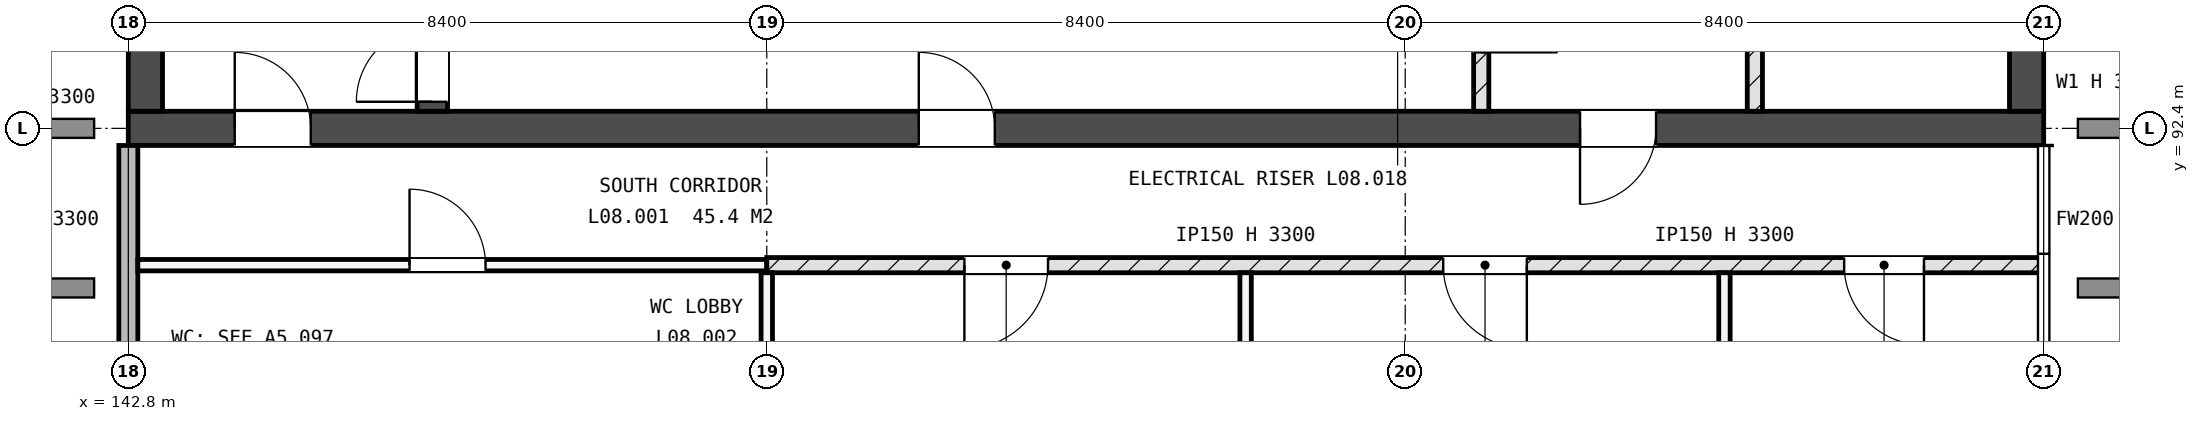
"""IFC4 building model, lengths in metres.
Left out: names, types, materials, properties, quantities, classifications, styles, units other than length and angle.
Written with IfcOpenShell. Run it as: python <this file> out.ifc"""

import sys

from ifc_helpers import new_model, si_unit, direction, frame, frame_2d, origin, place, context, subcontext, project, spatial, rectangle, extrude, element, fill, save


model = new_model("IFC4")
c1 = context("Model", 3, precision=1e-05, world=origin(), true_north=direction((0.0, 1.0)))
c2 = subcontext(c1, "Body", "Model", "MODEL_VIEW")
j1 = project(units=[si_unit("LENGTHUNIT", "METRE"), si_unit("PLANEANGLEUNIT", "RADIAN")], contexts=[c1])
p1 = place(None, origin())
s1 = spatial("IfcSite", under=j1, at=p1, CompositionType="ELEMENT")
p2 = place(p1, origin())
s2 = spatial("IfcBuilding", under=s1, at=p2, CompositionType="ELEMENT")
p3 = place(p2, frame((0.0, 0.0, 32.4)))
s3 = spatial("IfcBuildingStorey", under=s2, at=p3, CompositionType="ELEMENT", Elevation=32.4)
p4 = place(p3, frame((142.8, 92.4, -0.25), z_axis=(0.0, 0.0, 1.0), x_axis=(1.0, 0.0, 0.0)))
e1 = element("IfcWall", 1, at=p4, inside=s3, PredefinedType="SHEAR", context=c2, shape_type="SweptSolid", body=[
    extrude(rectangle(XDim=25.2, YDim=0.45, at=frame_2d((12.6, 0.0))), origin(), (0.0, 0.0, 1.0), 3.6),
])
p5 = place(p4, frame((1.4, 0.0, 0.25)))
e2 = element("IfcOpeningElement", 2, at=p5, cuts=e1, PredefinedType="OPENING", context=c2, shape_type="SweptSolid", body=[
    extrude(rectangle(XDim=1.0, YDim=2.1, at=frame_2d((0.5, 1.05))), frame((0.0, 0.235, 0.0), z_axis=(0.0, -1.0, 0.0), x_axis=(1.0, 0.0, 0.0)), (0.0, 0.0, 1.0), 0.47),
])
p6 = place(p4, frame((19.1, 0.0, 0.25)))
e3 = element("IfcOpeningElement", 3, at=p6, cuts=e1, PredefinedType="OPENING", context=c2, shape_type="SweptSolid", body=[
    extrude(rectangle(XDim=1.0, YDim=2.1, at=frame_2d((0.5, 1.05))), frame((0.0, 0.235, 0.0), z_axis=(0.0, -1.0, 0.0), x_axis=(1.0, 0.0, 0.0)), (0.0, 0.0, 1.0), 0.47),
])
p7 = place(p4, frame((10.4, 0.0, 0.25)))
e4 = element("IfcOpeningElement", 4, at=p7, cuts=e1, PredefinedType="OPENING", context=c2, shape_type="SweptSolid", body=[
    extrude(rectangle(XDim=1.0, YDim=2.1, at=frame_2d((0.5, 1.05))), frame((0.0, 0.235, 0.0), z_axis=(0.0, -1.0, 0.0), x_axis=(1.0, 0.0, 0.0)), (0.0, 0.0, 1.0), 0.47),
])
p8 = place(p3, frame((143.025, 92.625, -0.25), z_axis=(0.0, 0.0, 1.0), x_axis=(0.0, 1.0, 0.0)))
e5 = element("IfcWall", 5, at=p8, inside=s3, PredefinedType="SHEAR", context=c2, shape_type="SweptSolid", body=[
    extrude(rectangle(XDim=16.35, YDim=0.45, at=frame_2d((8.175, 0.0))), origin(), (0.0, 0.0, 1.0), 3.6),
])
p9 = place(p8, frame((2.975, 0.0, 1.85)))
e6 = element("IfcOpeningElement", 6, at=p9, cuts=e5, PredefinedType="OPENING", context=c2, shape_type="SweptSolid", body=[
    extrude(rectangle(XDim=1.2, YDim=0.9, at=frame_2d((0.6, 0.45))), frame((0.0, 0.235, 0.0), z_axis=(0.0, -1.0, 0.0), x_axis=(1.0, 0.0, 0.0)), (0.0, 0.0, 1.0), 0.47),
])
p10 = place(p3, frame((167.775, 92.625, -0.25), z_axis=(0.0, 0.0, 1.0), x_axis=(0.0, 1.0, 0.0)))
e7 = element("IfcWall", 7, at=p10, inside=s3, PredefinedType="SHEAR", context=c2, shape_type="SweptSolid", body=[
    extrude(rectangle(XDim=16.35, YDim=0.45, at=frame_2d((8.175, 0.0))), origin(), (0.0, 0.0, 1.0), 3.6),
])
p11 = place(p10, frame((12.175, 0.0, 1.85)))
e8 = element("IfcOpeningElement", 8, at=p11, cuts=e7, PredefinedType="OPENING", context=c2, shape_type="SweptSolid", body=[
    extrude(rectangle(XDim=1.2, YDim=0.9, at=frame_2d((0.6, 0.45))), frame((0.0, 0.235, 0.0), z_axis=(0.0, -1.0, 0.0), x_axis=(1.0, 0.0, 0.0)), (0.0, 0.0, 1.0), 0.47),
])
p12 = place(p3, frame((146.8, 92.625, -0.25), z_axis=(0.0, 0.0, 1.0), x_axis=(0.0, 1.0, 0.0)))
e9 = element("IfcWall", 9, at=p12, inside=s3, PredefinedType="SHEAR", context=c2, shape_type="SweptSolid", body=[
    extrude(rectangle(XDim=7.5, YDim=0.4, at=frame_2d((3.75, 0.0))), origin(), (0.0, 0.0, 1.0), 3.6),
])
p13 = place(p12, frame((0.125, 0.0, 0.25)))
e10 = element("IfcOpeningElement", 10, at=p13, cuts=e9, PredefinedType="OPENING", context=c2, shape_type="SweptSolid", body=[
    extrude(rectangle(XDim=1.0, YDim=2.1, at=frame_2d((0.5, 1.05))), frame((0.0, 0.21, 0.0), z_axis=(0.0, -1.0, 0.0), x_axis=(1.0, 0.0, 0.0)), (0.0, 0.0, 1.0), 0.42),
])
p14 = place(p3, frame((142.8, 84.45, 0.0), z_axis=(0.0, 0.0, 1.0), x_axis=(0.0, 1.0, 0.0)))
e11 = element("IfcWall", 11, at=p14, inside=s3, PredefinedType="STANDARD", context=c2, shape_type="SweptSolid", body=[
    extrude(rectangle(XDim=7.725, YDim=0.25, at=frame_2d((3.863, 0.0))), origin(), (0.0, 0.0, 1.0), 3.3),
])
p15 = place(p14, frame((2.25, 0.0, 2.1)))
e12 = element("IfcOpeningElement", 12, at=p15, cuts=e11, PredefinedType="OPENING", context=c2, shape_type="SweptSolid", body=[
    extrude(rectangle(XDim=0.9, YDim=0.6, at=frame_2d((0.45, 0.3))), frame((0.0, 0.135, 0.0), z_axis=(0.0, -1.0, 0.0), x_axis=(1.0, 0.0, 0.0)), (0.0, 0.0, 1.0), 0.27),
])
p16 = place(p3, frame((142.925, 90.6, 0.0), z_axis=(0.0, 0.0, 1.0), x_axis=(1.0, 0.0, 0.0)))
e13 = element("IfcWall", 13, at=p16, inside=s3, PredefinedType="PARTITIONING", context=c2, shape_type="SweptSolid", body=[
    extrude(rectangle(XDim=8.275, YDim=0.15, at=frame_2d((4.137, 0.0))), origin(), (0.0, 0.0, 1.0), 3.3),
])
p17 = place(p16, frame((3.575, 0.0, 0.0)))
e14 = element("IfcOpeningElement", 14, at=p17, cuts=e13, PredefinedType="OPENING", context=c2, shape_type="SweptSolid", body=[
    extrude(rectangle(XDim=1.0, YDim=2.1, at=frame_2d((0.5, 1.05))), frame((0.0, 0.085, 0.0), z_axis=(0.0, -1.0, 0.0), x_axis=(1.0, 0.0, 0.0)), (0.0, 0.0, 1.0), 0.17),
])
p18 = place(p3, frame((151.2, 90.6, 0.0), z_axis=(0.0, 0.0, 1.0), x_axis=(1.0, 0.0, 0.0)))
e15 = element("IfcWall", 15, at=p18, inside=s3, PredefinedType="SOLIDWALL", context=c2, shape_type="SweptSolid", body=[
    extrude(rectangle(XDim=16.8, YDim=0.2, at=frame_2d((8.4, 0.0))), origin(), (0.0, 0.0, 1.0), 3.3),
])
p19 = place(p18, frame((2.6, 0.0, 0.0)))
e16 = element("IfcOpeningElement", 16, at=p19, cuts=e15, PredefinedType="OPENING", context=c2, shape_type="SweptSolid", body=[
    extrude(rectangle(XDim=1.1, YDim=2.25, at=frame_2d((0.55, 1.125))), frame((0.0, 0.11, 0.0), z_axis=(0.0, -1.0, 0.0), x_axis=(1.0, 0.0, 0.0)), (0.0, 0.0, 1.0), 0.22),
])
p20 = place(p18, frame((8.9, 0.0, 0.0)))
e17 = element("IfcOpeningElement", 17, at=p20, cuts=e15, PredefinedType="OPENING", context=c2, shape_type="SweptSolid", body=[
    extrude(rectangle(XDim=1.1, YDim=2.25, at=frame_2d((0.55, 1.125))), frame((0.0, 0.11, 0.0), z_axis=(0.0, -1.0, 0.0), x_axis=(1.0, 0.0, 0.0)), (0.0, 0.0, 1.0), 0.22),
])
p21 = place(p18, frame((14.175, 0.0, 0.0)))
e18 = element("IfcOpeningElement", 18, at=p21, cuts=e15, PredefinedType="OPENING", context=c2, shape_type="SweptSolid", body=[
    extrude(rectangle(XDim=1.05, YDim=2.1, at=frame_2d((0.525, 1.05))), frame((0.0, 0.11, 0.0), z_axis=(0.0, -1.0, 0.0), x_axis=(1.0, 0.0, 0.0)), (0.0, 0.0, 1.0), 0.22),
])
p22 = place(p3, frame((151.2, 84.0, 0.0), z_axis=(0.0, 0.0, 1.0), x_axis=(0.0, 1.0, 0.0)))
e19 = element("IfcWall", 19, at=p22, inside=s3, PredefinedType="PARTITIONING", context=c2, shape_type="SweptSolid", body=[
    extrude(rectangle(XDim=6.5, YDim=0.15, at=frame_2d((3.25, 0.0))), origin(), (0.0, 0.0, 1.0), 2.6),
])
p23 = place(p3, frame((157.5, 84.0, 0.0), z_axis=(0.0, 0.0, 1.0), x_axis=(0.0, 1.0, 0.0)))
e20 = element("IfcWall", 20, at=p23, inside=s3, PredefinedType="PARTITIONING", context=c2, shape_type="SweptSolid", body=[
    extrude(rectangle(XDim=6.5, YDim=0.15, at=frame_2d((3.25, 0.0))), origin(), (0.0, 0.0, 1.0), 3.3),
])
p24 = place(p3, frame((160.6, 92.625, 0.0), z_axis=(0.0, 0.0, 1.0), x_axis=(0.0, 1.0, 0.0)))
e21 = element("IfcWall", 21, at=p24, inside=s3, PredefinedType="SOLIDWALL", context=c2, shape_type="SweptSolid", body=[
    extrude(rectangle(XDim=12.475, YDim=0.2, at=frame_2d((6.238, 0.0))), origin(), (0.0, 0.0, 1.0), 3.3),
])
p25 = place(p24, frame((5.075, 0.0, 0.0)))
e22 = element("IfcOpeningElement", 22, at=p25, cuts=e21, PredefinedType="OPENING", context=c2, shape_type="SweptSolid", body=[
    extrude(rectangle(XDim=0.8, YDim=2.1, at=frame_2d((0.4, 1.05))), frame((0.0, 0.11, 0.0), z_axis=(0.0, -1.0, 0.0), x_axis=(1.0, 0.0, 0.0)), (0.0, 0.0, 1.0), 0.22),
])
p26 = place(p24, frame((0.775, 0.0, 0.0)))
e23 = element("IfcOpeningElement", 23, at=p26, cuts=e21, PredefinedType="OPENING", context=c2, shape_type="SweptSolid", body=[
    extrude(rectangle(XDim=1.0, YDim=2.1, at=frame_2d((0.5, 1.05))), frame((0.0, 0.11, 0.0), z_axis=(0.0, -1.0, 0.0), x_axis=(1.0, 0.0, 0.0)), (0.0, 0.0, 1.0), 0.22),
])
p27 = place(p3, frame((163.8, 84.0, 0.0), z_axis=(0.0, 0.0, 1.0), x_axis=(0.0, 1.0, 0.0)))
e24 = element("IfcWall", 24, at=p27, inside=s3, PredefinedType="PARTITIONING", context=c2, shape_type="SweptSolid", body=[
    extrude(rectangle(XDim=6.5, YDim=0.15, at=frame_2d((3.25, 0.0))), origin(), (0.0, 0.0, 1.0), 3.3),
])
p28 = place(p3, frame((164.2, 92.625, 0.0), z_axis=(0.0, 0.0, 1.0), x_axis=(0.0, 1.0, 0.0)))
e25 = element("IfcWall", 25, at=p28, inside=s3, PredefinedType="SOLIDWALL", context=c2, shape_type="SweptSolid", body=[
    extrude(rectangle(XDim=8.725, YDim=0.2, at=frame_2d((4.363, 0.0))), origin(), (0.0, 0.0, 1.0), 3.3),
])
p29 = place(p28, frame((1.675, 0.0, 0.0)))
e26 = element("IfcOpeningElement", 26, at=p29, cuts=e25, PredefinedType="OPENING", context=c2, shape_type="SweptSolid", body=[
    extrude(rectangle(XDim=0.8, YDim=2.1, at=frame_2d((0.4, 1.05))), frame((0.0, 0.11, 0.0), z_axis=(0.0, -1.0, 0.0), x_axis=(1.0, 0.0, 0.0)), (0.0, 0.0, 1.0), 0.22),
])
p30 = place(p28, frame((6.275, 0.0, 0.0)))
e27 = element("IfcOpeningElement", 27, at=p30, cuts=e25, PredefinedType="OPENING", context=c2, shape_type="SweptSolid", body=[
    extrude(rectangle(XDim=0.8, YDim=2.1, at=frame_2d((0.4, 1.05))), frame((0.0, 0.11, 0.0), z_axis=(0.0, -1.0, 0.0), x_axis=(1.0, 0.0, 0.0)), (0.0, 0.0, 1.0), 0.22),
])
p31 = place(p5, origin())
e28 = element("IfcDoor", 28, at=p31, inside=s3, OperationType="SINGLE_SWING_RIGHT", PredefinedType="DOOR", context=c2, shape_type="SweptSolid", body=[
    extrude(rectangle(XDim=1.0, YDim=2.1, at=frame_2d((0.5, 1.05))), frame((0.0, 0.025, 0.0), z_axis=(0.0, -1.0, 0.0), x_axis=(1.0, 0.0, 0.0)), (0.0, 0.0, 1.0), 0.05),
])
fill(e2, e28)
p32 = place(p13, origin())
e29 = element("IfcDoor", 29, at=p32, inside=s3, OperationType="SINGLE_SWING_RIGHT", PredefinedType="DOOR", context=c2, shape_type="SweptSolid", body=[
    extrude(rectangle(XDim=1.0, YDim=2.1, at=frame_2d((0.5, 1.05))), frame((0.0, 0.025, 0.0), z_axis=(0.0, -1.0, 0.0), x_axis=(1.0, 0.0, 0.0)), (0.0, 0.0, 1.0), 0.05),
])
fill(e10, e29)
p33 = place(p19, origin())
e30 = element("IfcDoor", 30, at=p33, inside=s3, OperationType="SINGLE_SWING_LEFT", PredefinedType="DOOR", context=c2, shape_type="SweptSolid", body=[
    extrude(rectangle(XDim=1.1, YDim=2.25, at=frame_2d((0.55, 1.125))), frame((0.0, 0.025, 0.0), z_axis=(0.0, -1.0, 0.0), x_axis=(1.0, 0.0, 0.0)), (0.0, 0.0, 1.0), 0.05),
])
fill(e16, e30)
p34 = place(p20, origin())
e31 = element("IfcDoor", 31, at=p34, inside=s3, OperationType="SINGLE_SWING_RIGHT", PredefinedType="DOOR", context=c2, shape_type="SweptSolid", body=[
    extrude(rectangle(XDim=1.1, YDim=2.25, at=frame_2d((0.55, 1.125))), frame((0.0, 0.025, 0.0), z_axis=(0.0, -1.0, 0.0), x_axis=(1.0, 0.0, 0.0)), (0.0, 0.0, 1.0), 0.05),
])
fill(e17, e31)
p35 = place(p21, origin())
e32 = element("IfcDoor", 32, at=p35, inside=s3, OperationType="SINGLE_SWING_RIGHT", PredefinedType="DOOR", context=c2, shape_type="SweptSolid", body=[
    extrude(rectangle(XDim=1.05, YDim=2.1, at=frame_2d((0.525, 1.05))), frame((0.0, 0.025, 0.0), z_axis=(0.0, -1.0, 0.0), x_axis=(1.0, 0.0, 0.0)), (0.0, 0.0, 1.0), 0.05),
])
fill(e18, e32)
p36 = place(p17, origin())
e33 = element("IfcDoor", 33, at=p36, inside=s3, OperationType="SINGLE_SWING_RIGHT", PredefinedType="DOOR", context=c2, shape_type="SweptSolid", body=[
    extrude(rectangle(XDim=1.0, YDim=2.1, at=frame_2d((0.5, 1.05))), frame((0.0, 0.025, 0.0), z_axis=(0.0, -1.0, 0.0), x_axis=(1.0, 0.0, 0.0)), (0.0, 0.0, 1.0), 0.05),
])
fill(e14, e33)
p37 = place(p6, origin())
e34 = element("IfcDoor", 34, at=p37, inside=s3, OperationType="SINGLE_SWING_LEFT", PredefinedType="DOOR", context=c2, shape_type="SweptSolid", body=[
    extrude(rectangle(XDim=1.0, YDim=2.1, at=frame_2d((0.5, 1.05))), frame((0.0, 0.025, 0.0), z_axis=(0.0, -1.0, 0.0), x_axis=(1.0, 0.0, 0.0)), (0.0, 0.0, 1.0), 0.05),
])
fill(e3, e34)
p38 = place(p7, origin())
e35 = element("IfcDoor", 35, at=p38, inside=s3, OperationType="SINGLE_SWING_RIGHT", PredefinedType="DOOR", context=c2, shape_type="SweptSolid", body=[
    extrude(rectangle(XDim=1.0, YDim=2.1, at=frame_2d((0.5, 1.05))), frame((0.0, 0.025, 0.0), z_axis=(0.0, -1.0, 0.0), x_axis=(1.0, 0.0, 0.0)), (0.0, 0.0, 1.0), 0.05),
])
fill(e4, e35)
save(model, sys.argv[1])
